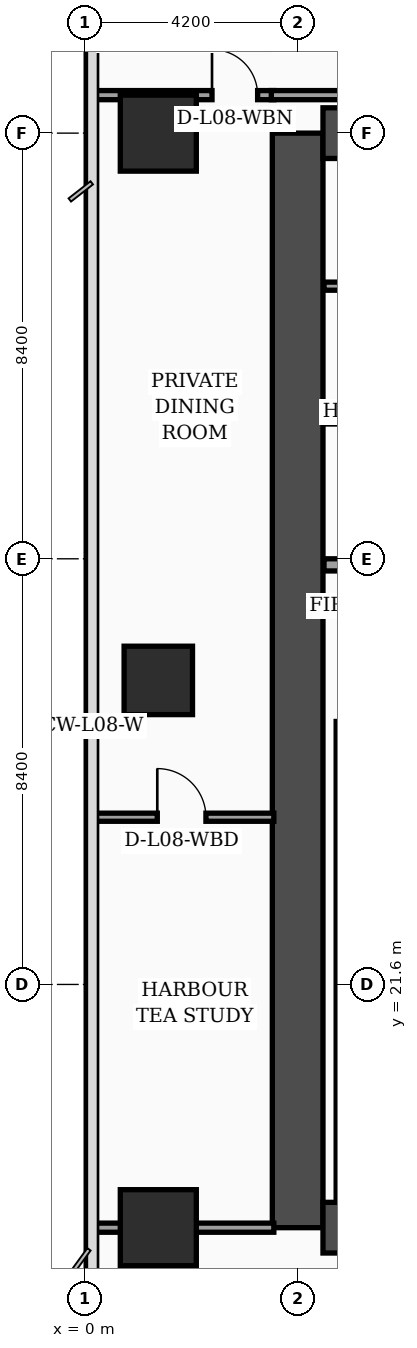
"""IFC4 building model, lengths in metres.
Left out: names, types, materials, properties, quantities, classifications, styles, units other than length and angle.
Written with IfcOpenShell. Run it as: python <this file> out.ifc"""

import sys

from ifc_helpers import new_model, si_unit, direction, frame, frame_2d, origin, origin_2d, place, context, subcontext, project, spatial, rectangle, extrude, element, fill, save


model = new_model("IFC4")
c1 = context("Model", 3, precision=1e-05, world=origin(), true_north=direction((0.0, 1.0)))
c2 = subcontext(c1, "Body", "Model", "MODEL_VIEW")
j1 = project(units=[si_unit("LENGTHUNIT", "METRE"), si_unit("PLANEANGLEUNIT", "RADIAN")], contexts=[c1])
p1 = place(None, origin())
s1 = spatial("IfcSite", under=j1, at=p1, CompositionType="ELEMENT")
p2 = place(p1, origin())
s2 = spatial("IfcBuilding", under=s1, at=p2, CompositionType="ELEMENT")
p3 = place(p2, frame((0.0, 0.0, 38.4)))
s3 = spatial("IfcBuildingStorey", under=s2, at=p3, CompositionType="ELEMENT", Elevation=38.4)
p4 = place(p3, frame((4.2, 16.8, 0.0), z_axis=(0.0, 0.0, 1.0), x_axis=(0.0, 1.0, 0.0)))
e1 = element("IfcWall", 1, at=p4, inside=s3, PredefinedType="SHEAR", context=c2, shape_type="SweptSolid", body=[
    extrude(rectangle(XDim=21.6, YDim=1.0, at=frame_2d((10.8, 0.0))), origin(), (0.0, 0.0, 1.0), 3.56),
])
for number, where, z_axis, x_axis in (
    (2, (4.7, 38.4, 0.0), (0.0, 0.0, 1.0), (1.0, 0.0, 0.0)),
    (3, (4.7, 16.8, 0.0), (0.0, 0.0, 1.0), (1.0, 0.0, 0.0)),
):
    element("IfcWall", number, at=place(p3, frame(where, z_axis=z_axis, x_axis=x_axis)), inside=s3, PredefinedType="SHEAR", context=c2, shape_type="SweptSolid", body=[
        extrude(rectangle(XDim=9.8, YDim=1.0, at=frame_2d((4.9, 0.0))), origin(), (0.0, 0.0, 1.0), 3.56),
    ])
p5 = place(p3, frame((5.08, 17.3, 0.0), z_axis=(0.0, 0.0, 1.0), x_axis=(0.0, 1.0, 0.0)))
e4 = element("IfcWall", 4, at=p5, inside=s3, PredefinedType="SOLIDWALL", context=c2, shape_type="SweptSolid", body=[
    extrude(rectangle(XDim=9.49, YDim=0.24, at=frame_2d((4.745, 0.0))), origin(), (0.0, 0.0, 1.0), 3.56),
])
p6 = place(p3, frame((1.45, 16.8, 0.0), z_axis=(0.0, 0.0, 1.0), x_axis=(1.0, 0.0, 0.0)))
e5 = element("IfcColumn", 5, at=p6, inside=s3, PredefinedType="COLUMN", context=c2, shape_type="SweptSolid", body=[
    extrude(rectangle(XDim=1.5, YDim=1.5, at=origin_2d()), origin(), (0.0, 0.0, 1.0), 3.56),
])
p7 = place(p3, frame((1.45, 27.6, 0.0), z_axis=(0.0, 0.0, 1.0), x_axis=(1.0, 0.0, 0.0)))
e6 = element("IfcColumn", 6, at=p7, inside=s3, PredefinedType="COLUMN", context=c2, shape_type="SweptSolid", body=[
    extrude(rectangle(XDim=1.35, YDim=1.35, at=origin_2d()), origin(), (0.0, 0.0, 1.0), 3.56),
])
p8 = place(p3, frame((1.45, 38.4, 0.0), z_axis=(0.0, 0.0, 1.0), x_axis=(1.0, 0.0, 0.0)))
e7 = element("IfcColumn", 7, at=p8, inside=s3, PredefinedType="COLUMN", context=c2, shape_type="SweptSolid", body=[
    extrude(rectangle(XDim=1.5, YDim=1.5, at=origin_2d()), origin(), (0.0, 0.0, 1.0), 3.56),
])
p9 = place(p3, frame((4.72, 29.88, 0.0), z_axis=(0.0, 0.0, 1.0), x_axis=(1.0, 0.0, 0.0)))
e8 = element("IfcWall", 8, at=p9, inside=s3, PredefinedType="SOLIDWALL", context=c2, shape_type="SweptSolid", body=[
    extrude(rectangle(XDim=4.7, YDim=0.24, at=frame_2d((2.35, 0.0))), origin(), (0.0, 0.0, 1.0), 3.56),
])
p10 = place(p9, frame((0.45, 0.0, 0.0)))
e9 = element("IfcOpeningElement", 9, at=p10, cuts=e8, PredefinedType="OPENING", context=c2, shape_type="SweptSolid", body=[
    extrude(rectangle(XDim=1.3, YDim=2.35, at=frame_2d((0.65, 1.175))), frame((0.0, 0.13, 0.0), z_axis=(0.0, -1.0, 0.0), x_axis=(1.0, 0.0, 0.0)), (0.0, 0.0, 1.0), 0.26),
])
p11 = place(p3, frame((4.72, 32.78, 0.0), z_axis=(0.0, 0.0, 1.0), x_axis=(1.0, 0.0, 0.0)))
e10 = element("IfcWall", 10, at=p11, inside=s3, PredefinedType="SOLIDWALL", context=c2, shape_type="SweptSolid", body=[
    extrude(rectangle(XDim=4.7, YDim=0.24, at=frame_2d((2.35, 0.0))), origin(), (0.0, 0.0, 1.0), 3.56),
])
p12 = place(p3, frame((4.72, 35.38, 0.0), z_axis=(0.0, 0.0, 1.0), x_axis=(1.0, 0.0, 0.0)))
e11 = element("IfcWall", 11, at=p12, inside=s3, PredefinedType="PARTITIONING", context=c2, shape_type="SweptSolid", body=[
    extrude(rectangle(XDim=4.7, YDim=0.16, at=frame_2d((2.35, 0.0))), origin(), (0.0, 0.0, 1.0), 3.56),
])
p13 = place(p12, frame((1.3, 0.0, 0.0)))
e12 = element("IfcOpeningElement", 12, at=p13, cuts=e11, PredefinedType="OPENING", context=c2, shape_type="SweptSolid", body=[
    extrude(rectangle(XDim=0.98, YDim=2.15, at=frame_2d((0.49, 1.075))), frame((0.0, 0.09, 0.0), z_axis=(0.0, -1.0, 0.0), x_axis=(1.0, 0.0, 0.0)), (0.0, 0.0, 1.0), 0.18),
])
p14 = place(p3, frame((0.08, 24.9, 0.0), z_axis=(0.0, 0.0, 1.0), x_axis=(1.0, 0.0, 0.0)))
e13 = element("IfcWall", 13, at=p14, inside=s3, PredefinedType="PARTITIONING", context=c2, shape_type="SweptSolid", body=[
    extrude(rectangle(XDim=3.65, YDim=0.16, at=frame_2d((1.825, 0.0))), origin(), (0.0, 0.0, 1.0), 3.04),
])
p15 = place(p14, frame((1.35, 0.0, 0.0)))
e14 = element("IfcOpeningElement", 14, at=p15, cuts=e13, PredefinedType="OPENING", context=c2, shape_type="SweptSolid", body=[
    extrude(rectangle(XDim=0.96, YDim=2.2, at=frame_2d((0.48, 1.1))), frame((0.0, 0.09, 0.0), z_axis=(0.0, -1.0, 0.0), x_axis=(1.0, 0.0, 0.0)), (0.0, 0.0, 1.0), 0.18),
])
p16 = place(p3, frame((0.08, 16.8, 0.0), z_axis=(0.0, 0.0, 1.0), x_axis=(1.0, 0.0, 0.0)))
e15 = element("IfcWall", 15, at=p16, inside=s3, PredefinedType="PARTITIONING", context=c2, shape_type="SweptSolid", body=[
    extrude(rectangle(XDim=3.65, YDim=0.18, at=frame_2d((1.825, 0.0))), origin(), (0.0, 0.0, 1.0), 2.84),
])
p17 = place(p3, frame((0.08, 39.15, 0.0), z_axis=(0.0, 0.0, 1.0), x_axis=(1.0, 0.0, 0.0)))
e16 = element("IfcWall", 16, at=p17, inside=s3, PredefinedType="PARTITIONING", context=c2, shape_type="SweptSolid", body=[
    extrude(rectangle(XDim=3.65, YDim=0.18, at=frame_2d((1.825, 0.0))), origin(), (0.0, 0.0, 1.0), 2.84),
])
p18 = place(p17, frame((2.43, 0.0, 0.0)))
e17 = element("IfcOpeningElement", 17, at=p18, cuts=e16, PredefinedType="OPENING", context=c2, shape_type="SweptSolid", body=[
    extrude(rectangle(XDim=0.9, YDim=2.15, at=frame_2d((0.45, 1.075))), frame((0.0, 0.1, 0.0), z_axis=(0.0, -1.0, 0.0), x_axis=(1.0, 0.0, 0.0)), (0.0, 0.0, 1.0), 0.2),
])
p19 = place(p3, frame((3.68, 39.15, 0.0), z_axis=(0.0, 0.0, 1.0), x_axis=(1.0, 0.0, 0.0)))
e18 = element("IfcWall", 18, at=p19, inside=s3, PredefinedType="PARTITIONING", context=c2, shape_type="SweptSolid", body=[
    extrude(rectangle(XDim=11.47, YDim=0.18, at=frame_2d((5.735, 0.0))), origin(), (0.0, 0.0, 1.0), 2.84),
])
p20 = place(p15, origin())
e19 = element("IfcDoor", 19, at=p20, inside=s3, OperationType="SINGLE_SWING_LEFT", PredefinedType="DOOR", context=c2, shape_type="SweptSolid", body=[
    extrude(rectangle(XDim=0.96, YDim=2.2, at=frame_2d((0.48, 1.1))), frame((0.0, 0.025, 0.0), z_axis=(0.0, -1.0, 0.0), x_axis=(1.0, 0.0, 0.0)), (0.0, 0.0, 1.0), 0.05),
])
fill(e14, e19)
p21 = place(p18, origin())
e20 = element("IfcDoor", 20, at=p21, inside=s3, OperationType="SINGLE_SWING_LEFT", PredefinedType="DOOR", context=c2, shape_type="SweptSolid", body=[
    extrude(rectangle(XDim=0.9, YDim=2.15, at=frame_2d((0.45, 1.075))), frame((0.0, 0.025, 0.0), z_axis=(0.0, -1.0, 0.0), x_axis=(1.0, 0.0, 0.0)), (0.0, 0.0, 1.0), 0.05),
])
fill(e17, e20)
save(model, sys.argv[1])
